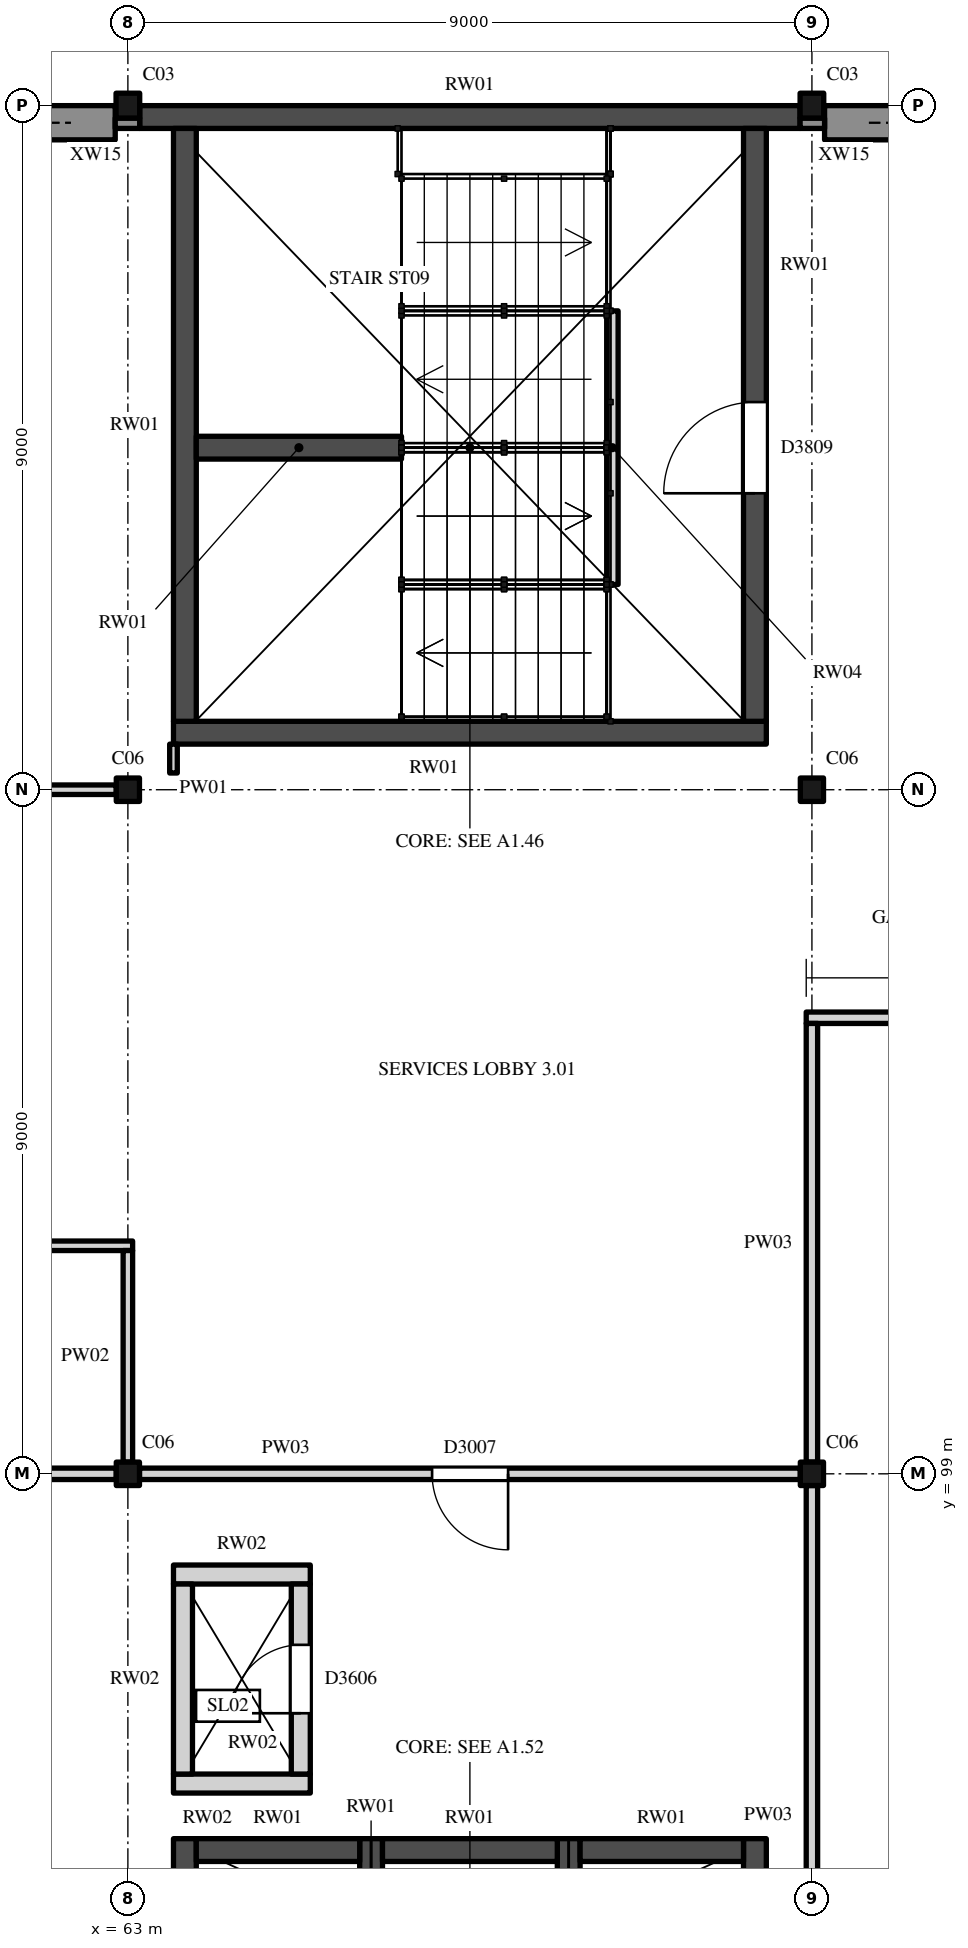
"""IFC4 building model, lengths in metres.
Left out: names, types, materials, properties, quantities, classifications, styles, units other than length and angle.
Written with IfcOpenShell. Run it as: python <this file> out.ifc"""

import sys

from ifc_helpers import new_model, si_unit, direction, frame, frame_2d, origin, origin_2d, place, context, subcontext, project, spatial, rectangle, i_section, extrude, element, fill, save


model = new_model("IFC4")
c1 = context("Model", 3, precision=1e-05, world=origin(), true_north=direction((0.0, 1.0)))
c2 = subcontext(c1, "Body", "Model", "MODEL_VIEW")
j1 = project(units=[si_unit("LENGTHUNIT", "METRE"), si_unit("PLANEANGLEUNIT", "RADIAN")], contexts=[c1])
p1 = place(None, origin())
s1 = spatial("IfcSite", under=j1, at=p1, CompositionType="ELEMENT")
p2 = place(p1, origin())
s2 = spatial("IfcBuilding", under=s1, at=p2, CompositionType="ELEMENT")
p3 = place(p2, frame((0.0, 0.0, 16.0)))
s3 = spatial("IfcBuildingStorey", under=s2, at=p3, CompositionType="ELEMENT", Elevation=16.0)
for number, where, z_axis, x_axis in (
    (1, (63.0, 99.0, 0.0), (0.0, 0.0, 1.0), (1.0, 0.0, 0.0)),
    (2, (72.0, 99.0, 0.0), (0.0, 0.0, 1.0), (1.0, 0.0, 0.0)),
    (3, (63.0, 108.0, 0.0), (0.0, 0.0, 1.0), (1.0, 0.0, 0.0)),
    (4, (72.0, 108.0, 0.0), (0.0, 0.0, 1.0), (1.0, 0.0, 0.0)),
):
    element("IfcColumn", number, at=place(p3, frame(where, z_axis=z_axis, x_axis=x_axis)), inside=s3, PredefinedType="COLUMN", context=c2, shape_type="SweptSolid", body=[
        extrude(i_section(OverallWidth=0.305, OverallDepth=0.308, WebThickness=0.01, FlangeThickness=0.015, FilletRadius=0.017, at=origin_2d()), origin(), (0.0, 0.0, 1.0), 10.0),
    ])
for number, where, z_axis, x_axis in (
    (5, (63.0, 117.0, 0.0), (0.0, 0.0, 1.0), (1.0, 0.0, 0.0)),
    (6, (72.0, 117.0, 0.0), (0.0, 0.0, 1.0), (1.0, 0.0, 0.0)),
):
    element("IfcColumn", number, at=place(p3, frame(where, z_axis=z_axis, x_axis=x_axis)), inside=s3, PredefinedType="COLUMN", context=c2, shape_type="SweptSolid", body=[
        extrude(i_section(OverallWidth=0.311, OverallDepth=0.327, WebThickness=0.016, FlangeThickness=0.025, FilletRadius=0.017, at=origin_2d()), origin(), (0.0, 0.0, 1.0), 10.0),
    ])
p4 = place(p3, frame((63.6, 108.75, 0.0), z_axis=(0.0, 0.0, 1.0), x_axis=(1.0, 0.0, 0.0)))
e7 = element("IfcWall", 7, at=p4, inside=s3, PredefinedType="SHEAR", context=c2, shape_type="SweptSolid", body=[
    extrude(rectangle(XDim=7.8, YDim=0.3, at=frame_2d((3.9, 0.0))), origin(), (0.0, 0.0, 1.0), 10.0),
])
p5 = place(p3, frame((63.156, 116.85, 0.0), z_axis=(0.0, 0.0, 1.0), x_axis=(1.0, 0.0, 0.0)))
e8 = element("IfcWall", 8, at=p5, inside=s3, PredefinedType="SHEAR", context=c2, shape_type="SweptSolid", body=[
    extrude(rectangle(XDim=8.689, YDim=0.3, at=frame_2d((4.344, 0.0))), origin(), (0.0, 0.0, 1.0), 10.0),
])
p6 = place(p3, frame((63.75, 108.9, 0.0), z_axis=(0.0, 0.0, 1.0), x_axis=(0.0, 1.0, 0.0)))
e9 = element("IfcWall", 9, at=p6, inside=s3, PredefinedType="SHEAR", context=c2, shape_type="SweptSolid", body=[
    extrude(rectangle(XDim=7.8, YDim=0.3, at=frame_2d((3.9, 0.0))), origin(), (0.0, 0.0, 1.0), 10.0),
])
p7 = place(p3, frame((71.25, 108.9, 0.0), z_axis=(0.0, 0.0, 1.0), x_axis=(0.0, 1.0, 0.0)))
e10 = element("IfcWall", 10, at=p7, inside=s3, PredefinedType="SHEAR", context=c2, shape_type="SweptSolid", body=[
    extrude(rectangle(XDim=7.8, YDim=0.3, at=frame_2d((3.9, 0.0))), origin(), (0.0, 0.0, 1.0), 10.0),
])
p8 = place(p7, frame((3.0, 0.0, 0.0)))
e11 = element("IfcOpeningElement", 11, at=p8, cuts=e10, PredefinedType="OPENING", context=c2, shape_type="SweptSolid", body=[
    extrude(rectangle(XDim=1.2, YDim=2.1, at=frame_2d((0.6, 1.05))), frame((0.0, 0.16, 0.0), z_axis=(0.0, -1.0, 0.0), x_axis=(1.0, 0.0, 0.0)), (0.0, 0.0, 1.0), 0.32),
])
p9 = place(p3, frame((66.6, 112.5, 0.0), z_axis=(0.0, 0.0, 1.0), x_axis=(-1.0, 0.0, 0.0)))
e12 = element("IfcWall", 12, at=p9, inside=s3, PredefinedType="SHEAR", context=c2, shape_type="SweptSolid", body=[
    extrude(rectangle(XDim=2.7, YDim=0.3, at=frame_2d((1.35, 0.0))), origin(), (0.0, 0.0, 1.0), 10.0),
])
p10 = place(p3, frame((69.375, 110.7, 0.0), z_axis=(0.0, 0.0, 1.0), x_axis=(0.0, 1.0, 0.0)))
e13 = element("IfcWall", 13, at=p10, inside=s3, PredefinedType="STANDARD", context=c2, shape_type="SweptSolid", body=[
    extrude(rectangle(XDim=3.6, YDim=0.15, at=frame_2d((1.8, 0.0))), origin(), (0.0, 0.0, 1.0), 3.133),
])
for number, where, z_axis, x_axis in (
    (14, (63.75, 90.6, 0.0), (0.0, 0.0, 1.0), (0.0, 1.0, 0.0)),
    (15, (66.2, 90.6, 0.0), (0.0, 0.0, 1.0), (0.0, 1.0, 0.0)),
    (16, (68.8, 90.6, 0.0), (0.0, 0.0, 1.0), (0.0, 1.0, 0.0)),
    (17, (71.25, 90.6, 0.0), (0.0, 0.0, 1.0), (0.0, 1.0, 0.0)),
):
    element("IfcWall", number, at=place(p3, frame(where, z_axis=z_axis, x_axis=x_axis)), inside=s3, PredefinedType="SHEAR", context=c2, shape_type="SweptSolid", body=[
        extrude(rectangle(XDim=3.6, YDim=0.3, at=frame_2d((1.8, 0.0))), origin(), (0.0, 0.0, 1.0), 10.0),
    ])
p11 = place(p3, frame((63.9, 94.05, 0.0), z_axis=(0.0, 0.0, 1.0), x_axis=(1.0, 0.0, 0.0)))
e18 = element("IfcWall", 18, at=p11, inside=s3, PredefinedType="SHEAR", context=c2, shape_type="SweptSolid", body=[
    extrude(rectangle(XDim=2.15, YDim=0.3, at=frame_2d((1.075, 0.0))), origin(), (0.0, 0.0, 1.0), 10.0),
])
p12 = place(p3, frame((66.35, 94.05, 0.0), z_axis=(0.0, 0.0, 1.0), x_axis=(1.0, 0.0, 0.0)))
e19 = element("IfcWall", 19, at=p12, inside=s3, PredefinedType="SHEAR", context=c2, shape_type="SweptSolid", body=[
    extrude(rectangle(XDim=2.3, YDim=0.3, at=frame_2d((1.15, 0.0))), origin(), (0.0, 0.0, 1.0), 10.0),
])
p13 = place(p3, frame((68.95, 94.05, 0.0), z_axis=(0.0, 0.0, 1.0), x_axis=(1.0, 0.0, 0.0)))
e20 = element("IfcWall", 20, at=p13, inside=s3, PredefinedType="SHEAR", context=c2, shape_type="SweptSolid", body=[
    extrude(rectangle(XDim=2.15, YDim=0.3, at=frame_2d((1.075, 0.0))), origin(), (0.0, 0.0, 1.0), 10.0),
])
for number, where, z_axis, x_axis in (
    (21, (63.6, 94.925, 0.0), (0.0, 0.0, 1.0), (1.0, 0.0, 0.0)),
    (22, (63.6, 97.675, 0.0), (0.0, 0.0, 1.0), (1.0, 0.0, 0.0)),
):
    element("IfcWall", number, at=place(p3, frame(where, z_axis=z_axis, x_axis=x_axis)), inside=s3, PredefinedType="STANDARD", context=c2, shape_type="SweptSolid", body=[
        extrude(rectangle(XDim=1.8, YDim=0.25, at=frame_2d((0.9, 0.0))), origin(), (0.0, 0.0, 1.0), 10.0),
    ])
p14 = place(p3, frame((63.725, 95.05, 0.0), z_axis=(0.0, 0.0, 1.0), x_axis=(0.0, 1.0, 0.0)))
e23 = element("IfcWall", 23, at=p14, inside=s3, PredefinedType="STANDARD", context=c2, shape_type="SweptSolid", body=[
    extrude(rectangle(XDim=2.5, YDim=0.25, at=frame_2d((1.25, 0.0))), origin(), (0.0, 0.0, 1.0), 10.0),
])
p15 = place(p3, frame((65.275, 95.05, 0.0), z_axis=(0.0, 0.0, 1.0), x_axis=(0.0, 1.0, 0.0)))
e24 = element("IfcWall", 24, at=p15, inside=s3, PredefinedType="STANDARD", context=c2, shape_type="SweptSolid", body=[
    extrude(rectangle(XDim=2.5, YDim=0.25, at=frame_2d((1.25, 0.0))), origin(), (0.0, 0.0, 1.0), 10.0),
])
p16 = place(p15, frame((0.8, 0.0, 0.0)))
e25 = element("IfcOpeningElement", 25, at=p16, cuts=e24, PredefinedType="OPENING", context=c2, shape_type="SweptSolid", body=[
    extrude(rectangle(XDim=0.9, YDim=2.1, at=frame_2d((0.45, 1.05))), frame((0.0, 0.135, 0.0), z_axis=(0.0, -1.0, 0.0), x_axis=(1.0, 0.0, 0.0)), (0.0, 0.0, 1.0), 0.27),
])
p17 = place(p3, frame((54.156, 116.775, 0.0), z_axis=(0.0, 0.0, 1.0), x_axis=(1.0, 0.0, 0.0)))
e26 = element("IfcWall", 26, at=p17, inside=s3, PredefinedType="SOLIDWALL", context=c2, shape_type="SweptSolid", body=[
    extrude(rectangle(XDim=8.678, YDim=0.45, at=frame_2d((4.339, 0.0))), origin(), (0.0, 0.0, 1.0), 9.473),
])
p18 = place(p17, frame((0.594, 0.0, 1.6)))
e27 = element("IfcOpeningElement", 27, at=p18, cuts=e26, PredefinedType="OPENING", context=c2, shape_type="SweptSolid", body=[
    extrude(rectangle(XDim=7.5, YDim=1.2, at=frame_2d((3.75, 0.6))), frame((0.0, 0.235, 0.0), z_axis=(0.0, -1.0, 0.0), x_axis=(1.0, 0.0, 0.0)), (0.0, 0.0, 1.0), 0.47),
])
p19 = place(p17, frame((0.594, 0.0, 6.4)))
e28 = element("IfcOpeningElement", 28, at=p19, cuts=e26, PredefinedType="OPENING", context=c2, shape_type="SweptSolid", body=[
    extrude(rectangle(XDim=7.5, YDim=1.2, at=frame_2d((3.75, 0.6))), frame((0.0, 0.235, 0.0), z_axis=(0.0, -1.0, 0.0), x_axis=(1.0, 0.0, 0.0)), (0.0, 0.0, 1.0), 0.47),
])
p20 = place(p3, frame((72.167, 116.775, 0.0), z_axis=(0.0, 0.0, 1.0), x_axis=(1.0, 0.0, 0.0)))
e29 = element("IfcWall", 29, at=p20, inside=s3, PredefinedType="SOLIDWALL", context=c2, shape_type="SweptSolid", body=[
    extrude(rectangle(XDim=8.673, YDim=0.45, at=frame_2d((4.336, 0.0))), origin(), (0.0, 0.0, 1.0), 9.473),
])
p21 = place(p20, frame((0.583, 0.0, 1.6)))
e30 = element("IfcOpeningElement", 30, at=p21, cuts=e29, PredefinedType="OPENING", context=c2, shape_type="SweptSolid", body=[
    extrude(rectangle(XDim=7.5, YDim=1.2, at=frame_2d((3.75, 0.6))), frame((0.0, 0.235, 0.0), z_axis=(0.0, -1.0, 0.0), x_axis=(1.0, 0.0, 0.0)), (0.0, 0.0, 1.0), 0.47),
])
p22 = place(p20, frame((0.583, 0.0, 6.4)))
e31 = element("IfcOpeningElement", 31, at=p22, cuts=e29, PredefinedType="OPENING", context=c2, shape_type="SweptSolid", body=[
    extrude(rectangle(XDim=7.5, YDim=1.2, at=frame_2d((3.75, 0.6))), frame((0.0, 0.235, 0.0), z_axis=(0.0, -1.0, 0.0), x_axis=(1.0, 0.0, 0.0)), (0.0, 0.0, 1.0), 0.47),
])
for number, where, z_axis, x_axis in (
    (32, (62.833, 116.768, 0.0), (0.0, 0.0, 1.0), (1.0, 0.0, 0.0)),
    (33, (71.844, 116.768, 0.0), (0.0, 0.0, 1.0), (1.0, 0.0, 0.0)),
):
    element("IfcWall", number, at=place(p3, frame(where, z_axis=z_axis, x_axis=x_axis)), inside=s3, PredefinedType="SOLIDWALL", context=c2, shape_type="SweptSolid", body=[
        extrude(rectangle(XDim=0.322, YDim=0.136, at=frame_2d((0.161, 0.0))), origin(), (0.0, 0.0, 1.0), 10.0),
    ])
p23 = place(p3, frame((54.45, 99.0, 0.0), z_axis=(0.0, 0.0, 1.0), x_axis=(1.0, 0.0, 0.0)))
e34 = element("IfcWall", 34, at=p23, inside=s3, PredefinedType="PARTITIONING", context=c2, shape_type="SweptSolid", body=[
    extrude(rectangle(XDim=8.397, YDim=0.15, at=frame_2d((4.199, 0.0))), origin(), (0.0, 0.0, 1.0), 9.473),
])
p24 = place(p3, frame((63.153, 99.0, 0.0), z_axis=(0.0, 0.0, 1.0), x_axis=(1.0, 0.0, 0.0)))
e35 = element("IfcWall", 35, at=p24, inside=s3, PredefinedType="PARTITIONING", context=c2, shape_type="SweptSolid", body=[
    extrude(rectangle(XDim=8.695, YDim=0.15, at=frame_2d((4.347, 0.0))), origin(), (0.0, 0.0, 1.0), 9.473),
])
p25 = place(p24, frame((3.85, 0.0, 0.0)))
e36 = element("IfcOpeningElement", 36, at=p25, cuts=e35, PredefinedType="OPENING", context=c2, shape_type="SweptSolid", body=[
    extrude(rectangle(XDim=1.0, YDim=2.4, at=frame_2d((0.5, 1.2))), frame((0.0, 0.085, 0.0), z_axis=(0.0, -1.0, 0.0), x_axis=(1.0, 0.0, 0.0)), (0.0, 0.0, 1.0), 0.17),
])
p26 = place(p3, frame((54.45, 102.0, 0.0), z_axis=(0.0, 0.0, 1.0), x_axis=(1.0, 0.0, 0.0)))
e37 = element("IfcWall", 37, at=p26, inside=s3, PredefinedType="PARTITIONING", context=c2, shape_type="SweptSolid", body=[
    extrude(rectangle(XDim=8.613, YDim=0.125, at=frame_2d((4.306, 0.0))), origin(), (0.0, 0.0, 1.0), 9.521),
])
p27 = place(p26, frame((1.15, 0.0, 0.0)))
e38 = element("IfcOpeningElement", 38, at=p27, cuts=e37, PredefinedType="OPENING", context=c2, shape_type="SweptSolid", body=[
    extrude(rectangle(XDim=0.9, YDim=2.1, at=frame_2d((0.45, 1.05))), frame((0.0, 0.073, 0.0), z_axis=(0.0, -1.0, 0.0), x_axis=(1.0, 0.0, 0.0)), (0.0, 0.0, 1.0), 0.145),
])
p28 = place(p26, frame((5.4, 0.0, 0.0)))
e39 = element("IfcOpeningElement", 39, at=p28, cuts=e37, PredefinedType="OPENING", context=c2, shape_type="SweptSolid", body=[
    extrude(rectangle(XDim=0.9, YDim=2.1, at=frame_2d((0.45, 1.05))), frame((0.0, 0.073, 0.0), z_axis=(0.0, -1.0, 0.0), x_axis=(1.0, 0.0, 0.0)), (0.0, 0.0, 1.0), 0.145),
])
p29 = place(p3, frame((71.925, 105.0, 0.0), z_axis=(0.0, 0.0, 1.0), x_axis=(1.0, 0.0, 0.0)))
e40 = element("IfcWall", 40, at=p29, inside=s3, PredefinedType="PARTITIONING", context=c2, shape_type="SweptSolid", body=[
    extrude(rectangle(XDim=27.15, YDim=0.15, at=frame_2d((13.575, 0.0))), origin(), (0.0, 0.0, 1.0), 9.521),
])
p30 = place(p29, frame((5.925, 0.0, 0.0)))
e41 = element("IfcOpeningElement", 41, at=p30, cuts=e40, PredefinedType="OPENING", context=c2, shape_type="SweptSolid", body=[
    extrude(rectangle(XDim=1.8, YDim=2.4, at=frame_2d((0.9, 1.2))), frame((0.0, 0.085, 0.0), z_axis=(0.0, -1.0, 0.0), x_axis=(1.0, 0.0, 0.0)), (0.0, 0.0, 1.0), 0.17),
])
p31 = place(p29, frame((19.425, 0.0, 0.0)))
e42 = element("IfcOpeningElement", 42, at=p31, cuts=e40, PredefinedType="OPENING", context=c2, shape_type="SweptSolid", body=[
    extrude(rectangle(XDim=1.8, YDim=2.4, at=frame_2d((0.9, 1.2))), frame((0.0, 0.085, 0.0), z_axis=(0.0, -1.0, 0.0), x_axis=(1.0, 0.0, 0.0)), (0.0, 0.0, 1.0), 0.17),
])
p32 = place(p3, frame((54.45, 108.0, 0.0), z_axis=(0.0, 0.0, 1.0), x_axis=(1.0, 0.0, 0.0)))
e43 = element("IfcWall", 43, at=p32, inside=s3, PredefinedType="PARTITIONING", context=c2, shape_type="SweptSolid", body=[
    extrude(rectangle(XDim=8.397, YDim=0.125, at=frame_2d((4.199, 0.0))), origin(), (0.0, 0.0, 1.0), 9.473),
])
p33 = place(p32, frame((6.5, 0.0, 0.0)))
e44 = element("IfcOpeningElement", 44, at=p33, cuts=e43, PredefinedType="OPENING", context=c2, shape_type="SweptSolid", body=[
    extrude(rectangle(XDim=1.0, YDim=2.1, at=frame_2d((0.5, 1.05))), frame((0.0, 0.073, 0.0), z_axis=(0.0, -1.0, 0.0), x_axis=(1.0, 0.0, 0.0)), (0.0, 0.0, 1.0), 0.145),
])
p34 = place(p3, frame((63.0, 99.154, 0.0), z_axis=(0.0, 0.0, 1.0), x_axis=(0.0, 1.0, 0.0)))
e45 = element("IfcWall", 45, at=p34, inside=s3, PredefinedType="PARTITIONING", context=c2, shape_type="SweptSolid", body=[
    extrude(rectangle(XDim=2.783, YDim=0.125, at=frame_2d((1.392, 0.0))), origin(), (0.0, 0.0, 1.0), 9.371),
])
p35 = place(p3, frame((63.6, 108.22, 0.0), z_axis=(0.0, 0.0, 1.0), x_axis=(0.0, 1.0, 0.0)))
e46 = element("IfcWall", 46, at=p35, inside=s3, PredefinedType="PARTITIONING", context=c2, shape_type="SweptSolid", body=[
    extrude(rectangle(XDim=0.38, YDim=0.1, at=frame_2d((0.19, 0.0))), origin(), (0.0, 0.0, 1.0), 9.825),
])
p36 = place(p3, frame((72.0, 90.164, 0.0), z_axis=(0.0, 0.0, 1.0), x_axis=(0.0, 1.0, 0.0)))
e47 = element("IfcWall", 47, at=p36, inside=s3, PredefinedType="PARTITIONING", context=c2, shape_type="SweptSolid", body=[
    extrude(rectangle(XDim=8.682, YDim=0.15, at=frame_2d((4.341, 0.0))), origin(), (0.0, 0.0, 1.0), 9.371),
])
p37 = place(p3, frame((72.0, 99.154, 0.0), z_axis=(0.0, 0.0, 1.0), x_axis=(0.0, 1.0, 0.0)))
e48 = element("IfcWall", 48, at=p37, inside=s3, PredefinedType="PARTITIONING", context=c2, shape_type="SweptSolid", body=[
    extrude(rectangle(XDim=5.771, YDim=0.15, at=frame_2d((2.885, 0.0))), origin(), (0.0, 0.0, 1.0), 9.371),
])
p38 = place(p8, origin())
e49 = element("IfcDoor", 49, at=p38, inside=s3, OperationType="SINGLE_SWING_RIGHT", PredefinedType="DOOR", context=c2, shape_type="SweptSolid", body=[
    extrude(rectangle(XDim=1.2, YDim=2.1, at=frame_2d((0.6, 1.05))), frame((0.0, 0.025, 0.0), z_axis=(0.0, -1.0, 0.0), x_axis=(1.0, 0.0, 0.0)), (0.0, 0.0, 1.0), 0.05),
])
fill(e11, e49)
p39 = place(p16, origin())
e50 = element("IfcDoor", 50, at=p39, inside=s3, OperationType="SINGLE_SWING_RIGHT", PredefinedType="DOOR", context=c2, shape_type="SweptSolid", body=[
    extrude(rectangle(XDim=0.9, YDim=2.1, at=frame_2d((0.45, 1.05))), frame((0.0, 0.025, 0.0), z_axis=(0.0, -1.0, 0.0), x_axis=(1.0, 0.0, 0.0)), (0.0, 0.0, 1.0), 0.05),
])
fill(e25, e50)
p40 = place(p18, origin())
e51 = element("IfcWindow", 51, at=p40, inside=s3, PartitioningType="SINGLE_PANEL", PredefinedType="WINDOW", context=c2, shape_type="SweptSolid", body=[
    extrude(rectangle(XDim=7.5, YDim=1.2, at=frame_2d((3.75, 0.6))), frame((0.0, 0.03, 0.0), z_axis=(0.0, -1.0, 0.0), x_axis=(1.0, 0.0, 0.0)), (0.0, 0.0, 1.0), 0.06),
])
fill(e27, e51)
p41 = place(p19, origin())
e52 = element("IfcWindow", 52, at=p41, inside=s3, PartitioningType="SINGLE_PANEL", PredefinedType="WINDOW", context=c2, shape_type="SweptSolid", body=[
    extrude(rectangle(XDim=7.5, YDim=1.2, at=frame_2d((3.75, 0.6))), frame((0.0, 0.03, 0.0), z_axis=(0.0, -1.0, 0.0), x_axis=(1.0, 0.0, 0.0)), (0.0, 0.0, 1.0), 0.06),
])
fill(e28, e52)
p42 = place(p21, origin())
e53 = element("IfcWindow", 53, at=p42, inside=s3, PartitioningType="SINGLE_PANEL", PredefinedType="WINDOW", context=c2, shape_type="SweptSolid", body=[
    extrude(rectangle(XDim=7.5, YDim=1.2, at=frame_2d((3.75, 0.6))), frame((0.0, 0.03, 0.0), z_axis=(0.0, -1.0, 0.0), x_axis=(1.0, 0.0, 0.0)), (0.0, 0.0, 1.0), 0.06),
])
fill(e30, e53)
p43 = place(p22, origin())
e54 = element("IfcWindow", 54, at=p43, inside=s3, PartitioningType="SINGLE_PANEL", PredefinedType="WINDOW", context=c2, shape_type="SweptSolid", body=[
    extrude(rectangle(XDim=7.5, YDim=1.2, at=frame_2d((3.75, 0.6))), frame((0.0, 0.03, 0.0), z_axis=(0.0, -1.0, 0.0), x_axis=(1.0, 0.0, 0.0)), (0.0, 0.0, 1.0), 0.06),
])
fill(e31, e54)
p44 = place(p25, origin())
e55 = element("IfcDoor", 55, at=p44, inside=s3, OperationType="SINGLE_SWING_RIGHT", PredefinedType="DOOR", context=c2, shape_type="SweptSolid", body=[
    extrude(rectangle(XDim=1.0, YDim=2.4, at=frame_2d((0.5, 1.2))), frame((0.0, 0.025, 0.0), z_axis=(0.0, -1.0, 0.0), x_axis=(1.0, 0.0, 0.0)), (0.0, 0.0, 1.0), 0.05),
])
fill(e36, e55)
save(model, sys.argv[1])
